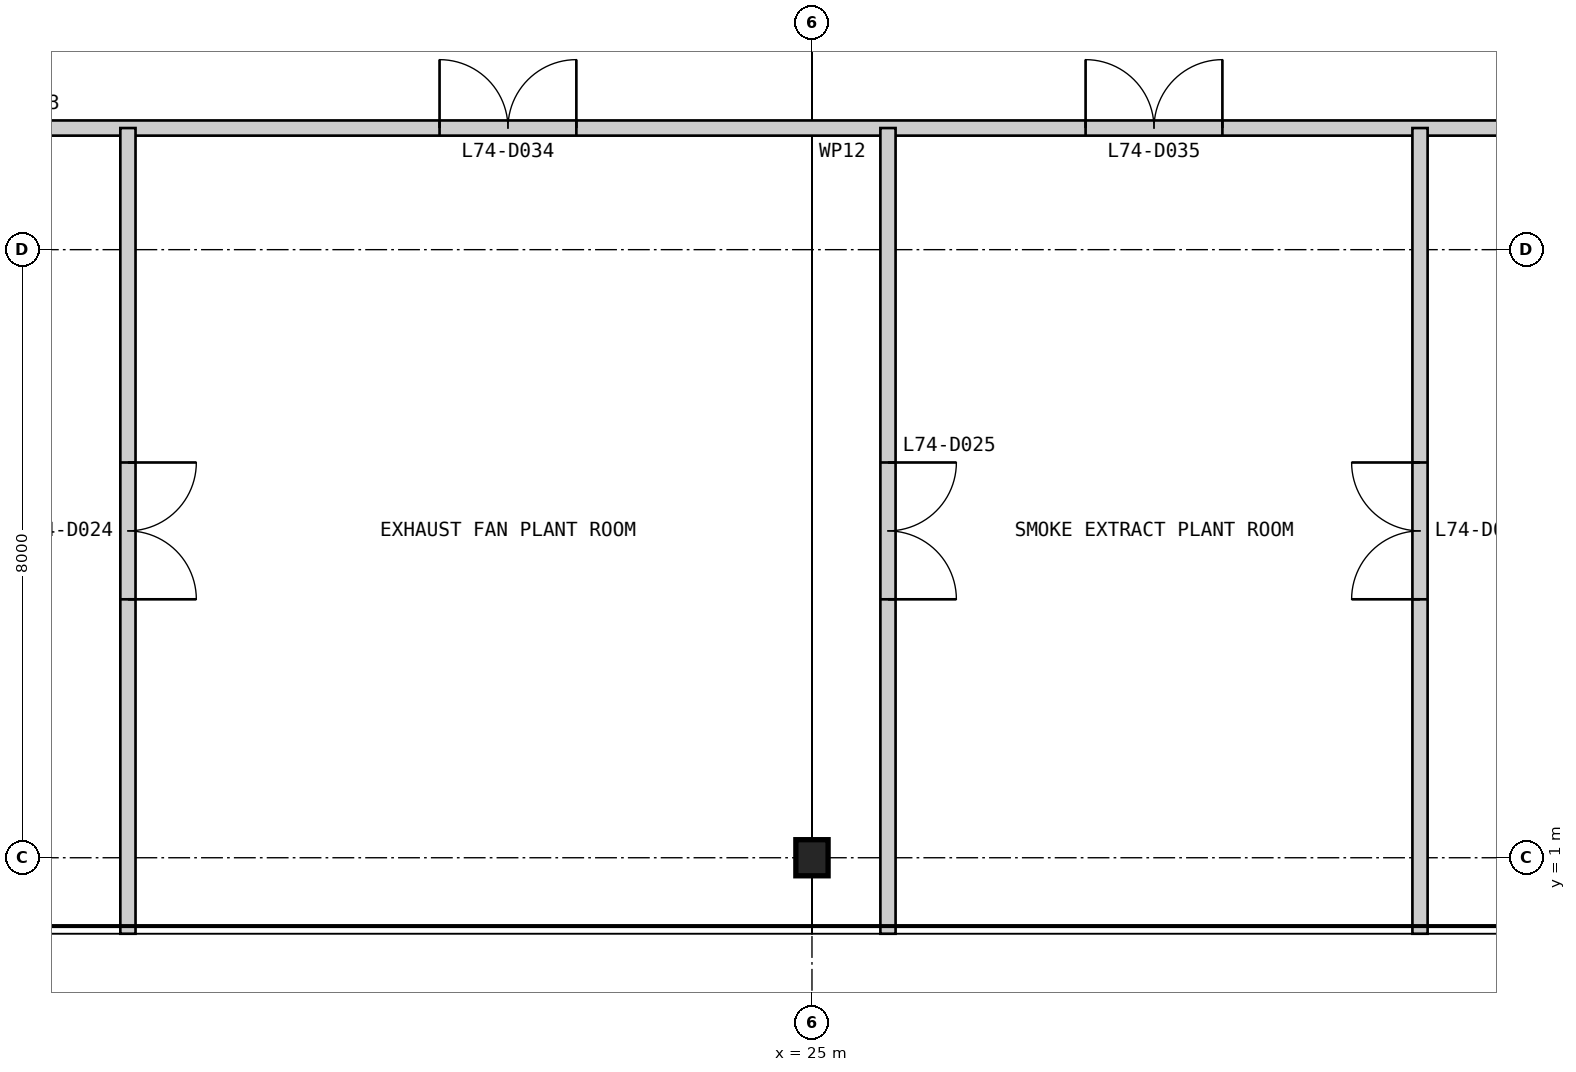
"""IFC4 building model, lengths in metres.
Left out: names, types, materials, properties, quantities, classifications, styles, units other than length and angle.
Written with IfcOpenShell. Run it as: python <this file> out.ifc"""

import sys

from ifc_helpers import new_model, si_unit, direction, frame, frame_2d, origin, origin_2d, place, context, subcontext, project, spatial, rectangle, i_section, extrude, element, fill, save


model = new_model("IFC4")
c1 = context("Model", 3, precision=1e-05, world=origin(), true_north=direction((0.0, 1.0)))
c2 = subcontext(c1, "Body", "Model", "MODEL_VIEW")
j1 = project(units=[si_unit("LENGTHUNIT", "METRE"), si_unit("PLANEANGLEUNIT", "RADIAN")], contexts=[c1])
p1 = place(None, origin())
s1 = spatial("IfcSite", under=j1, at=p1, CompositionType="ELEMENT")
p2 = place(p1, origin())
s2 = spatial("IfcBuilding", under=s1, at=p2, CompositionType="ELEMENT")
p3 = place(p2, frame((0.0, 0.0, 307.8)))
s3 = spatial("IfcBuildingStorey", under=s2, at=p3, CompositionType="ELEMENT", Elevation=307.8)
p4 = place(p3, frame((25.0, 1.0, 0.0), z_axis=(0.0, 0.0, 1.0), x_axis=(1.0, 0.0, 0.0)))
e1 = element("IfcColumn", 1, at=p4, inside=s3, PredefinedType="COLUMN", context=c2, shape_type="SweptSolid", body=[
    extrude(i_section(OverallWidth=0.424, OverallDepth=0.475, WebThickness=0.048, FlangeThickness=0.077, at=origin_2d()), origin(), (0.0, 0.0, 1.0), 5.75),
])
p5 = place(p3, frame((13.0, 10.6, 0.0), z_axis=(0.0, 0.0, 1.0), x_axis=(1.0, 0.0, 0.0)))
e2 = element("IfcWall", 2, at=p5, inside=s3, PredefinedType="PARTITIONING", context=c2, shape_type="SweptSolid", body=[
    extrude(rectangle(XDim=24.0, YDim=0.2, at=frame_2d((12.0, 0.0))), origin(), (0.0, 0.0, 1.0), 5.75),
])
p6 = place(p5, frame((1.05, 0.0, 0.0)))
e3 = element("IfcOpeningElement", 3, at=p6, cuts=e2, PredefinedType="OPENING", context=c2, shape_type="SweptSolid", body=[
    extrude(rectangle(XDim=0.9, YDim=2.2, at=frame_2d((0.45, 1.1))), frame((0.0, 0.11, 0.0), z_axis=(0.0, -1.0, 0.0), x_axis=(1.0, 0.0, 0.0)), (0.0, 0.0, 1.0), 0.22),
])
p7 = place(p5, frame((7.1, 0.0, 0.0)))
e4 = element("IfcOpeningElement", 4, at=p7, cuts=e2, PredefinedType="OPENING", context=c2, shape_type="SweptSolid", body=[
    extrude(rectangle(XDim=1.8, YDim=2.4, at=frame_2d((0.9, 1.2))), frame((0.0, 0.11, 0.0), z_axis=(0.0, -1.0, 0.0), x_axis=(1.0, 0.0, 0.0)), (0.0, 0.0, 1.0), 0.22),
])
p8 = place(p5, frame((15.6, 0.0, 0.0)))
e5 = element("IfcOpeningElement", 5, at=p8, cuts=e2, PredefinedType="OPENING", context=c2, shape_type="SweptSolid", body=[
    extrude(rectangle(XDim=1.8, YDim=2.4, at=frame_2d((0.9, 1.2))), frame((0.0, 0.11, 0.0), z_axis=(0.0, -1.0, 0.0), x_axis=(1.0, 0.0, 0.0)), (0.0, 0.0, 1.0), 0.22),
])
p9 = place(p5, frame((21.1, 0.0, 0.0)))
e6 = element("IfcOpeningElement", 6, at=p9, cuts=e2, PredefinedType="OPENING", context=c2, shape_type="SweptSolid", body=[
    extrude(rectangle(XDim=1.8, YDim=2.4, at=frame_2d((0.9, 1.2))), frame((0.0, 0.11, 0.0), z_axis=(0.0, -1.0, 0.0), x_axis=(1.0, 0.0, 0.0)), (0.0, 0.0, 1.0), 0.22),
])
p10 = place(p3, frame((16.0, 0.0, 0.0), z_axis=(0.0, 0.0, 1.0), x_axis=(0.0, 1.0, 0.0)))
e7 = element("IfcWall", 7, at=p10, inside=s3, PredefinedType="PARTITIONING", context=c2, shape_type="SweptSolid", body=[
    extrude(rectangle(XDim=10.6, YDim=0.2, at=frame_2d((5.3, 0.0))), origin(), (0.0, 0.0, 1.0), 4.904),
])
p11 = place(p10, frame((4.4, 0.0, 0.0)))
e8 = element("IfcOpeningElement", 8, at=p11, cuts=e7, PredefinedType="OPENING", context=c2, shape_type="SweptSolid", body=[
    extrude(rectangle(XDim=1.8, YDim=2.4, at=frame_2d((0.9, 1.2))), frame((0.0, 0.11, 0.0), z_axis=(0.0, -1.0, 0.0), x_axis=(1.0, 0.0, 0.0)), (0.0, 0.0, 1.0), 0.22),
])
p12 = place(p3, frame((26.0, 0.0, 0.0), z_axis=(0.0, 0.0, 1.0), x_axis=(0.0, 1.0, 0.0)))
e9 = element("IfcWall", 9, at=p12, inside=s3, PredefinedType="PARTITIONING", context=c2, shape_type="SweptSolid", body=[
    extrude(rectangle(XDim=10.6, YDim=0.2, at=frame_2d((5.3, 0.0))), origin(), (0.0, 0.0, 1.0), 5.75),
])
p13 = place(p12, frame((4.4, 0.0, 0.0)))
e10 = element("IfcOpeningElement", 10, at=p13, cuts=e9, PredefinedType="OPENING", context=c2, shape_type="SweptSolid", body=[
    extrude(rectangle(XDim=1.8, YDim=2.4, at=frame_2d((0.9, 1.2))), frame((0.0, 0.11, 0.0), z_axis=(0.0, -1.0, 0.0), x_axis=(1.0, 0.0, 0.0)), (0.0, 0.0, 1.0), 0.22),
])
p14 = place(p3, frame((33.0, 0.0, 0.0), z_axis=(0.0, 0.0, 1.0), x_axis=(0.0, 1.0, 0.0)))
e11 = element("IfcWall", 11, at=p14, inside=s3, PredefinedType="PARTITIONING", context=c2, shape_type="SweptSolid", body=[
    extrude(rectangle(XDim=10.6, YDim=0.2, at=frame_2d((5.3, 0.0))), origin(), (0.0, 0.0, 1.0), 5.75),
])
p15 = place(p14, frame((4.4, 0.0, 0.0)))
e12 = element("IfcOpeningElement", 12, at=p15, cuts=e11, PredefinedType="OPENING", context=c2, shape_type="SweptSolid", body=[
    extrude(rectangle(XDim=1.8, YDim=2.4, at=frame_2d((0.9, 1.2))), frame((0.0, 0.11, 0.0), z_axis=(0.0, -1.0, 0.0), x_axis=(1.0, 0.0, 0.0)), (0.0, 0.0, 1.0), 0.22),
])
p16 = place(p11, frame((1.8, 0.0, 0.0), z_axis=(0.0, 0.0, 1.0), x_axis=(-1.0, 0.0, 0.0)))
e13 = element("IfcDoor", 13, at=p16, inside=s3, OperationType="DOUBLE_DOOR_SINGLE_SWING", PredefinedType="DOOR", context=c2, shape_type="SweptSolid", body=[
    extrude(rectangle(XDim=1.8, YDim=2.4, at=frame_2d((0.9, 1.2))), frame((0.0, 0.025, 0.0), z_axis=(0.0, -1.0, 0.0), x_axis=(1.0, 0.0, 0.0)), (0.0, 0.0, 1.0), 0.05),
])
fill(e8, e13)
p17 = place(p13, frame((1.8, 0.0, 0.0), z_axis=(0.0, 0.0, 1.0), x_axis=(-1.0, 0.0, 0.0)))
e14 = element("IfcDoor", 14, at=p17, inside=s3, OperationType="DOUBLE_DOOR_SINGLE_SWING", PredefinedType="DOOR", context=c2, shape_type="SweptSolid", body=[
    extrude(rectangle(XDim=1.8, YDim=2.4, at=frame_2d((0.9, 1.2))), frame((0.0, 0.025, 0.0), z_axis=(0.0, -1.0, 0.0), x_axis=(1.0, 0.0, 0.0)), (0.0, 0.0, 1.0), 0.05),
])
fill(e10, e14)
p18 = place(p15, origin())
e15 = element("IfcDoor", 15, at=p18, inside=s3, OperationType="DOUBLE_DOOR_SINGLE_SWING", PredefinedType="DOOR", context=c2, shape_type="SweptSolid", body=[
    extrude(rectangle(XDim=1.8, YDim=2.4, at=frame_2d((0.9, 1.2))), frame((0.0, 0.025, 0.0), z_axis=(0.0, -1.0, 0.0), x_axis=(1.0, 0.0, 0.0)), (0.0, 0.0, 1.0), 0.05),
])
fill(e12, e15)
p19 = place(p7, origin())
e16 = element("IfcDoor", 16, at=p19, inside=s3, OperationType="DOUBLE_DOOR_SINGLE_SWING", PredefinedType="DOOR", context=c2, shape_type="SweptSolid", body=[
    extrude(rectangle(XDim=1.8, YDim=2.4, at=frame_2d((0.9, 1.2))), frame((0.0, 0.025, 0.0), z_axis=(0.0, -1.0, 0.0), x_axis=(1.0, 0.0, 0.0)), (0.0, 0.0, 1.0), 0.05),
])
fill(e4, e16)
p20 = place(p8, origin())
e17 = element("IfcDoor", 17, at=p20, inside=s3, OperationType="DOUBLE_DOOR_SINGLE_SWING", PredefinedType="DOOR", context=c2, shape_type="SweptSolid", body=[
    extrude(rectangle(XDim=1.8, YDim=2.4, at=frame_2d((0.9, 1.2))), frame((0.0, 0.025, 0.0), z_axis=(0.0, -1.0, 0.0), x_axis=(1.0, 0.0, 0.0)), (0.0, 0.0, 1.0), 0.05),
])
fill(e5, e17)
save(model, sys.argv[1])
